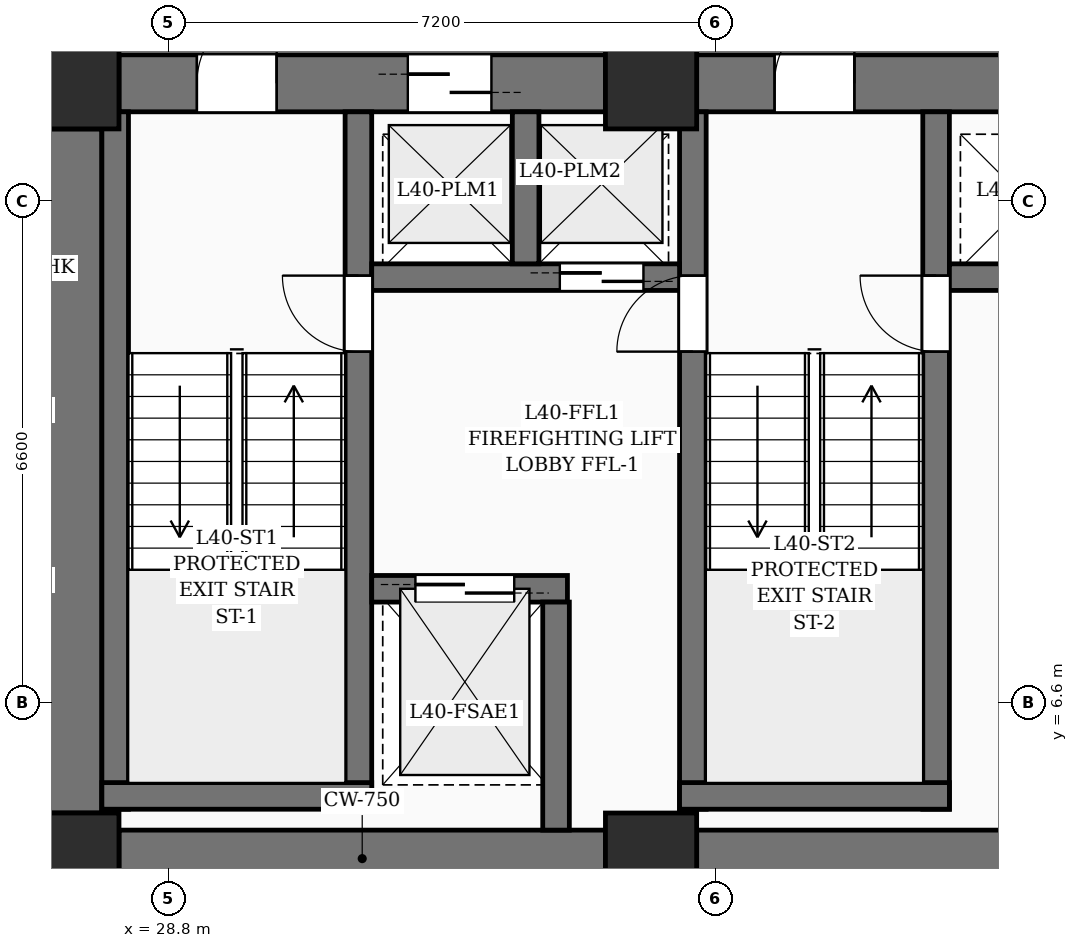
"""IFC4 building model, lengths in metres.
Left out: names, types, materials, properties, quantities, classifications, styles, units other than length and angle.
Written with IfcOpenShell. Run it as: python <this file> out.ifc"""

import sys

from ifc_helpers import new_model, si_unit, direction, frame, frame_2d, origin, origin_2d, place, context, subcontext, project, spatial, rectangle, extrude, element, fill, save


model = new_model("IFC4")
c1 = context("Model", 3, precision=1e-05, world=origin(), true_north=direction((0.0, 1.0)))
c2 = subcontext(c1, "Body", "Model", "MODEL_VIEW")
j1 = project(units=[si_unit("LENGTHUNIT", "METRE"), si_unit("PLANEANGLEUNIT", "RADIAN")], contexts=[c1])
p1 = place(None, origin())
s1 = spatial("IfcSite", under=j1, at=p1, CompositionType="ELEMENT")
p2 = place(p1, origin())
s2 = spatial("IfcBuilding", under=s1, at=p2, CompositionType="ELEMENT")
p3 = place(p2, frame((0.0, 0.0, 157.2)))
s3 = spatial("IfcBuildingStorey", under=s2, at=p3, CompositionType="ELEMENT", Elevation=157.2)
for number, where, z_axis, x_axis in (
    (1, (27.55, 4.55, 0.0), (0.0, 0.0, 1.0), (1.0, 0.0, 0.0)),
    (2, (35.15, 4.55, 0.0), (0.0, 0.0, 1.0), (1.0, 0.0, 0.0)),
    (3, (27.55, 14.75, 0.0), (0.0, 0.0, 1.0), (1.0, 0.0, 0.0)),
    (4, (35.15, 14.75, 0.0), (0.0, 0.0, 1.0), (1.0, 0.0, 0.0)),
):
    element("IfcColumn", number, at=place(p3, frame(where, z_axis=z_axis, x_axis=x_axis)), inside=s3, PredefinedType="COLUMN", context=c2, shape_type="SweptSolid", body=[
        extrude(rectangle(XDim=1.2, YDim=1.2, at=origin_2d()), origin(), (0.0, 0.0, 1.0), 3.6),
    ])
p4 = place(p3, frame((28.15, 4.55, 0.0), z_axis=(0.0, 0.0, 1.0), x_axis=(1.0, 0.0, 0.0)))
e5 = element("IfcWall", 5, at=p4, inside=s3, PredefinedType="SHEAR", context=c2, shape_type="SweptSolid", body=[
    extrude(rectangle(XDim=6.4, YDim=0.75, at=frame_2d((3.2, 0.0))), origin(), (0.0, 0.0, 1.0), 3.6),
])
p5 = place(p3, frame((35.75, 4.55, 0.0), z_axis=(0.0, 0.0, 1.0), x_axis=(1.0, 0.0, 0.0)))
e6 = element("IfcWall", 6, at=p5, inside=s3, PredefinedType="SHEAR", context=c2, shape_type="SweptSolid", body=[
    extrude(rectangle(XDim=10.7, YDim=0.75, at=frame_2d((5.35, 0.0))), origin(), (0.0, 0.0, 1.0), 3.6),
])
p6 = place(p3, frame((28.15, 14.75, 0.0), z_axis=(0.0, 0.0, 1.0), x_axis=(1.0, 0.0, 0.0)))
e7 = element("IfcWall", 7, at=p6, inside=s3, PredefinedType="SHEAR", context=c2, shape_type="SweptSolid", body=[
    extrude(rectangle(XDim=6.4, YDim=0.75, at=frame_2d((3.2, 0.0))), origin(), (0.0, 0.0, 1.0), 3.6),
])
p7 = place(p6, frame((1.025, 0.0, 0.0)))
e8 = element("IfcOpeningElement", 8, at=p7, cuts=e7, PredefinedType="OPENING", context=c2, shape_type="SweptSolid", body=[
    extrude(rectangle(XDim=1.05, YDim=2.15, at=frame_2d((0.525, 1.075))), frame((0.0, 0.385, 0.0), z_axis=(0.0, -1.0, 0.0), x_axis=(1.0, 0.0, 0.0)), (0.0, 0.0, 1.0), 0.77),
])
p8 = place(p6, frame((3.8, 0.0, 0.0)))
e9 = element("IfcOpeningElement", 9, at=p8, cuts=e7, PredefinedType="OPENING", context=c2, shape_type="SweptSolid", body=[
    extrude(rectangle(XDim=1.1, YDim=2.2, at=frame_2d((0.55, 1.1))), frame((0.0, 0.385, 0.0), z_axis=(0.0, -1.0, 0.0), x_axis=(1.0, 0.0, 0.0)), (0.0, 0.0, 1.0), 0.77),
])
p9 = place(p3, frame((35.75, 14.75, 0.0), z_axis=(0.0, 0.0, 1.0), x_axis=(1.0, 0.0, 0.0)))
e10 = element("IfcWall", 10, at=p9, inside=s3, PredefinedType="SHEAR", context=c2, shape_type="SweptSolid", body=[
    extrude(rectangle(XDim=10.7, YDim=0.75, at=frame_2d((5.35, 0.0))), origin(), (0.0, 0.0, 1.0), 3.6),
])
p10 = place(p9, frame((1.025, 0.0, 0.0)))
e11 = element("IfcOpeningElement", 11, at=p10, cuts=e10, PredefinedType="OPENING", context=c2, shape_type="SweptSolid", body=[
    extrude(rectangle(XDim=1.05, YDim=2.15, at=frame_2d((0.525, 1.075))), frame((0.0, 0.385, 0.0), z_axis=(0.0, -1.0, 0.0), x_axis=(1.0, 0.0, 0.0)), (0.0, 0.0, 1.0), 0.77),
])
p11 = place(p9, frame((8.625, 0.0, 0.0)))
e12 = element("IfcOpeningElement", 12, at=p11, cuts=e10, PredefinedType="OPENING", context=c2, shape_type="SweptSolid", body=[
    extrude(rectangle(XDim=1.05, YDim=2.15, at=frame_2d((0.525, 1.075))), frame((0.0, 0.385, 0.0), z_axis=(0.0, -1.0, 0.0), x_axis=(1.0, 0.0, 0.0)), (0.0, 0.0, 1.0), 0.77),
])
p12 = place(p3, frame((27.55, 5.15, 0.0), z_axis=(0.0, 0.0, 1.0), x_axis=(0.0, 1.0, 0.0)))
e13 = element("IfcWall", 13, at=p12, inside=s3, PredefinedType="SHEAR", context=c2, shape_type="SweptSolid", body=[
    extrude(rectangle(XDim=9.0, YDim=0.75, at=frame_2d((4.5, 0.0))), origin(), (0.0, 0.0, 1.0), 3.6),
])
p13 = place(p3, frame((28.1, 5.2, 0.0), z_axis=(0.0, 0.0, 1.0), x_axis=(0.0, 1.0, 0.0)))
e14 = element("IfcWall", 14, at=p13, inside=s3, PredefinedType="SOLIDWALL", context=c2, shape_type="SweptSolid", body=[
    extrude(rectangle(XDim=9.175, YDim=0.35, at=frame_2d((4.587, 0.0))), origin(), (0.0, 0.0, 1.0), 3.6),
])
p14 = place(p3, frame((31.3, 5.2, 0.0), z_axis=(0.0, 0.0, 1.0), x_axis=(0.0, 1.0, 0.0)))
e15 = element("IfcWall", 15, at=p14, inside=s3, PredefinedType="SOLIDWALL", context=c2, shape_type="SweptSolid", body=[
    extrude(rectangle(XDim=9.175, YDim=0.35, at=frame_2d((4.587, 0.0))), origin(), (0.0, 0.0, 1.0), 3.6),
])
p15 = place(p14, frame((6.02, 0.0, 0.0)))
e16 = element("IfcOpeningElement", 16, at=p15, cuts=e15, PredefinedType="OPENING", context=c2, shape_type="SweptSolid", body=[
    extrude(rectangle(XDim=1.0, YDim=2.15, at=frame_2d((0.5, 1.075))), frame((0.0, 0.185, 0.0), z_axis=(0.0, -1.0, 0.0), x_axis=(1.0, 0.0, 0.0)), (0.0, 0.0, 1.0), 0.37),
])
p16 = place(p3, frame((27.925, 5.375, 0.0), z_axis=(0.0, 0.0, 1.0), x_axis=(1.0, 0.0, 0.0)))
e17 = element("IfcWall", 17, at=p16, inside=s3, PredefinedType="SOLIDWALL", context=c2, shape_type="SweptSolid", body=[
    extrude(rectangle(XDim=3.55, YDim=0.35, at=frame_2d((1.775, 0.0))), origin(), (0.0, 0.0, 1.0), 3.6),
])
p17 = place(p3, frame((35.7, 5.2, 0.0), z_axis=(0.0, 0.0, 1.0), x_axis=(0.0, 1.0, 0.0)))
e18 = element("IfcWall", 18, at=p17, inside=s3, PredefinedType="SOLIDWALL", context=c2, shape_type="SweptSolid", body=[
    extrude(rectangle(XDim=9.175, YDim=0.35, at=frame_2d((4.587, 0.0))), origin(), (0.0, 0.0, 1.0), 3.6),
])
p18 = place(p17, frame((6.02, 0.0, 0.0)))
e19 = element("IfcOpeningElement", 19, at=p18, cuts=e18, PredefinedType="OPENING", context=c2, shape_type="SweptSolid", body=[
    extrude(rectangle(XDim=1.0, YDim=2.15, at=frame_2d((0.5, 1.075))), frame((0.0, 0.185, 0.0), z_axis=(0.0, -1.0, 0.0), x_axis=(1.0, 0.0, 0.0)), (0.0, 0.0, 1.0), 0.37),
])
p19 = place(p3, frame((38.9, 5.2, 0.0), z_axis=(0.0, 0.0, 1.0), x_axis=(0.0, 1.0, 0.0)))
e20 = element("IfcWall", 20, at=p19, inside=s3, PredefinedType="SOLIDWALL", context=c2, shape_type="SweptSolid", body=[
    extrude(rectangle(XDim=9.175, YDim=0.35, at=frame_2d((4.587, 0.0))), origin(), (0.0, 0.0, 1.0), 3.6),
])
p20 = place(p19, frame((6.02, 0.0, 0.0)))
e21 = element("IfcOpeningElement", 21, at=p20, cuts=e20, PredefinedType="OPENING", context=c2, shape_type="SweptSolid", body=[
    extrude(rectangle(XDim=1.0, YDim=2.15, at=frame_2d((0.5, 1.075))), frame((0.0, 0.185, 0.0), z_axis=(0.0, -1.0, 0.0), x_axis=(1.0, 0.0, 0.0)), (0.0, 0.0, 1.0), 0.37),
])
p21 = place(p3, frame((35.525, 5.375, 0.0), z_axis=(0.0, 0.0, 1.0), x_axis=(1.0, 0.0, 0.0)))
e22 = element("IfcWall", 22, at=p21, inside=s3, PredefinedType="SOLIDWALL", context=c2, shape_type="SweptSolid", body=[
    extrude(rectangle(XDim=3.55, YDim=0.35, at=frame_2d((1.775, 0.0))), origin(), (0.0, 0.0, 1.0), 3.6),
])
p22 = place(p3, frame((31.475, 8.1, 0.0), z_axis=(0.0, 0.0, 1.0), x_axis=(1.0, 0.0, 0.0)))
e23 = element("IfcWall", 23, at=p22, inside=s3, PredefinedType="SOLIDWALL", context=c2, shape_type="SweptSolid", body=[
    extrude(rectangle(XDim=2.575, YDim=0.35, at=frame_2d((1.288, 0.0))), origin(), (0.0, 0.0, 1.0), 3.6),
])
p23 = place(p22, frame((0.575, 0.0, 0.0)))
e24 = element("IfcOpeningElement", 24, at=p23, cuts=e23, PredefinedType="OPENING", context=c2, shape_type="SweptSolid", body=[
    extrude(rectangle(XDim=1.3, YDim=2.25, at=frame_2d((0.65, 1.125))), frame((0.0, 0.185, 0.0), z_axis=(0.0, -1.0, 0.0), x_axis=(1.0, 0.0, 0.0)), (0.0, 0.0, 1.0), 0.37),
])
p24 = place(p3, frame((33.9, 4.925, 0.0), z_axis=(0.0, 0.0, 1.0), x_axis=(0.0, 1.0, 0.0)))
e25 = element("IfcWall", 25, at=p24, inside=s3, PredefinedType="SOLIDWALL", context=c2, shape_type="SweptSolid", body=[
    extrude(rectangle(XDim=3.0, YDim=0.35, at=frame_2d((1.5, 0.0))), origin(), (0.0, 0.0, 1.0), 3.6),
])
p25 = place(p3, frame((31.475, 12.2, 0.0), z_axis=(0.0, 0.0, 1.0), x_axis=(1.0, 0.0, 0.0)))
e26 = element("IfcWall", 26, at=p25, inside=s3, PredefinedType="SOLIDWALL", context=c2, shape_type="SweptSolid", body=[
    extrude(rectangle(XDim=4.05, YDim=0.35, at=frame_2d((2.025, 0.0))), origin(), (0.0, 0.0, 1.0), 3.6),
])
p26 = place(p25, frame((2.475, 0.0, 0.0)))
e27 = element("IfcOpeningElement", 27, at=p26, cuts=e26, PredefinedType="OPENING", context=c2, shape_type="SweptSolid", body=[
    extrude(rectangle(XDim=1.1, YDim=2.2, at=frame_2d((0.55, 1.1))), frame((0.0, 0.185, 0.0), z_axis=(0.0, -1.0, 0.0), x_axis=(1.0, 0.0, 0.0)), (0.0, 0.0, 1.0), 0.37),
])
p27 = place(p3, frame((33.5, 12.375, 0.0), z_axis=(0.0, 0.0, 1.0), x_axis=(0.0, 1.0, 0.0)))
e28 = element("IfcWall", 28, at=p27, inside=s3, PredefinedType="SOLIDWALL", context=c2, shape_type="SweptSolid", body=[
    extrude(rectangle(XDim=2.0, YDim=0.35, at=frame_2d((1.0, 0.0))), origin(), (0.0, 0.0, 1.0), 3.6),
])
p28 = place(p3, frame((39.075, 12.2, 0.0), z_axis=(0.0, 0.0, 1.0), x_axis=(1.0, 0.0, 0.0)))
e29 = element("IfcWall", 29, at=p28, inside=s3, PredefinedType="SOLIDWALL", context=c2, shape_type="SweptSolid", body=[
    extrude(rectangle(XDim=4.05, YDim=0.35, at=frame_2d((2.025, 0.0))), origin(), (0.0, 0.0, 1.0), 3.6),
])
p29 = place(p7, origin())
e30 = element("IfcDoor", 30, at=p29, inside=s3, OperationType="SINGLE_SWING_RIGHT", PredefinedType="DOOR", context=c2, shape_type="SweptSolid", body=[
    extrude(rectangle(XDim=1.05, YDim=2.15, at=frame_2d((0.525, 1.075))), frame((0.0, 0.025, 0.0), z_axis=(0.0, -1.0, 0.0), x_axis=(1.0, 0.0, 0.0)), (0.0, 0.0, 1.0), 0.05),
])
fill(e8, e30)
p30 = place(p10, origin())
e31 = element("IfcDoor", 31, at=p30, inside=s3, OperationType="SINGLE_SWING_RIGHT", PredefinedType="DOOR", context=c2, shape_type="SweptSolid", body=[
    extrude(rectangle(XDim=1.05, YDim=2.15, at=frame_2d((0.525, 1.075))), frame((0.0, 0.025, 0.0), z_axis=(0.0, -1.0, 0.0), x_axis=(1.0, 0.0, 0.0)), (0.0, 0.0, 1.0), 0.05),
])
fill(e11, e31)
p31 = place(p15, origin())
e32 = element("IfcDoor", 32, at=p31, inside=s3, OperationType="SINGLE_SWING_RIGHT", PredefinedType="DOOR", context=c2, shape_type="SweptSolid", body=[
    extrude(rectangle(XDim=1.0, YDim=2.15, at=frame_2d((0.5, 1.075))), frame((0.0, 0.025, 0.0), z_axis=(0.0, -1.0, 0.0), x_axis=(1.0, 0.0, 0.0)), (0.0, 0.0, 1.0), 0.05),
])
fill(e16, e32)
p32 = place(p18, origin())
e33 = element("IfcDoor", 33, at=p32, inside=s3, OperationType="SINGLE_SWING_LEFT", PredefinedType="DOOR", context=c2, shape_type="SweptSolid", body=[
    extrude(rectangle(XDim=1.0, YDim=2.15, at=frame_2d((0.5, 1.075))), frame((0.0, 0.025, 0.0), z_axis=(0.0, -1.0, 0.0), x_axis=(1.0, 0.0, 0.0)), (0.0, 0.0, 1.0), 0.05),
])
fill(e19, e33)
p33 = place(p20, origin())
e34 = element("IfcDoor", 34, at=p33, inside=s3, OperationType="SINGLE_SWING_RIGHT", PredefinedType="DOOR", context=c2, shape_type="SweptSolid", body=[
    extrude(rectangle(XDim=1.0, YDim=2.15, at=frame_2d((0.5, 1.075))), frame((0.0, 0.025, 0.0), z_axis=(0.0, -1.0, 0.0), x_axis=(1.0, 0.0, 0.0)), (0.0, 0.0, 1.0), 0.05),
])
fill(e21, e34)
p34 = place(p23, origin())
e35 = element("IfcDoor", 35, at=p34, inside=s3, OperationType="DOUBLE_DOOR_SLIDING", PredefinedType="DOOR", context=c2, shape_type="SweptSolid", body=[
    extrude(rectangle(XDim=1.3, YDim=2.25, at=frame_2d((0.65, 1.125))), frame((0.0, 0.025, 0.0), z_axis=(0.0, -1.0, 0.0), x_axis=(1.0, 0.0, 0.0)), (0.0, 0.0, 1.0), 0.05),
])
fill(e24, e35)
p35 = place(p8, origin())
e36 = element("IfcDoor", 36, at=p35, inside=s3, OperationType="DOUBLE_DOOR_SLIDING", PredefinedType="DOOR", context=c2, shape_type="SweptSolid", body=[
    extrude(rectangle(XDim=1.1, YDim=2.2, at=frame_2d((0.55, 1.1))), frame((0.0, 0.025, 0.0), z_axis=(0.0, -1.0, 0.0), x_axis=(1.0, 0.0, 0.0)), (0.0, 0.0, 1.0), 0.05),
])
fill(e9, e36)
p36 = place(p26, origin())
e37 = element("IfcDoor", 37, at=p36, inside=s3, OperationType="DOUBLE_DOOR_SLIDING", PredefinedType="DOOR", context=c2, shape_type="SweptSolid", body=[
    extrude(rectangle(XDim=1.1, YDim=2.2, at=frame_2d((0.55, 1.1))), frame((0.0, 0.025, 0.0), z_axis=(0.0, -1.0, 0.0), x_axis=(1.0, 0.0, 0.0)), (0.0, 0.0, 1.0), 0.05),
])
fill(e27, e37)
save(model, sys.argv[1])
